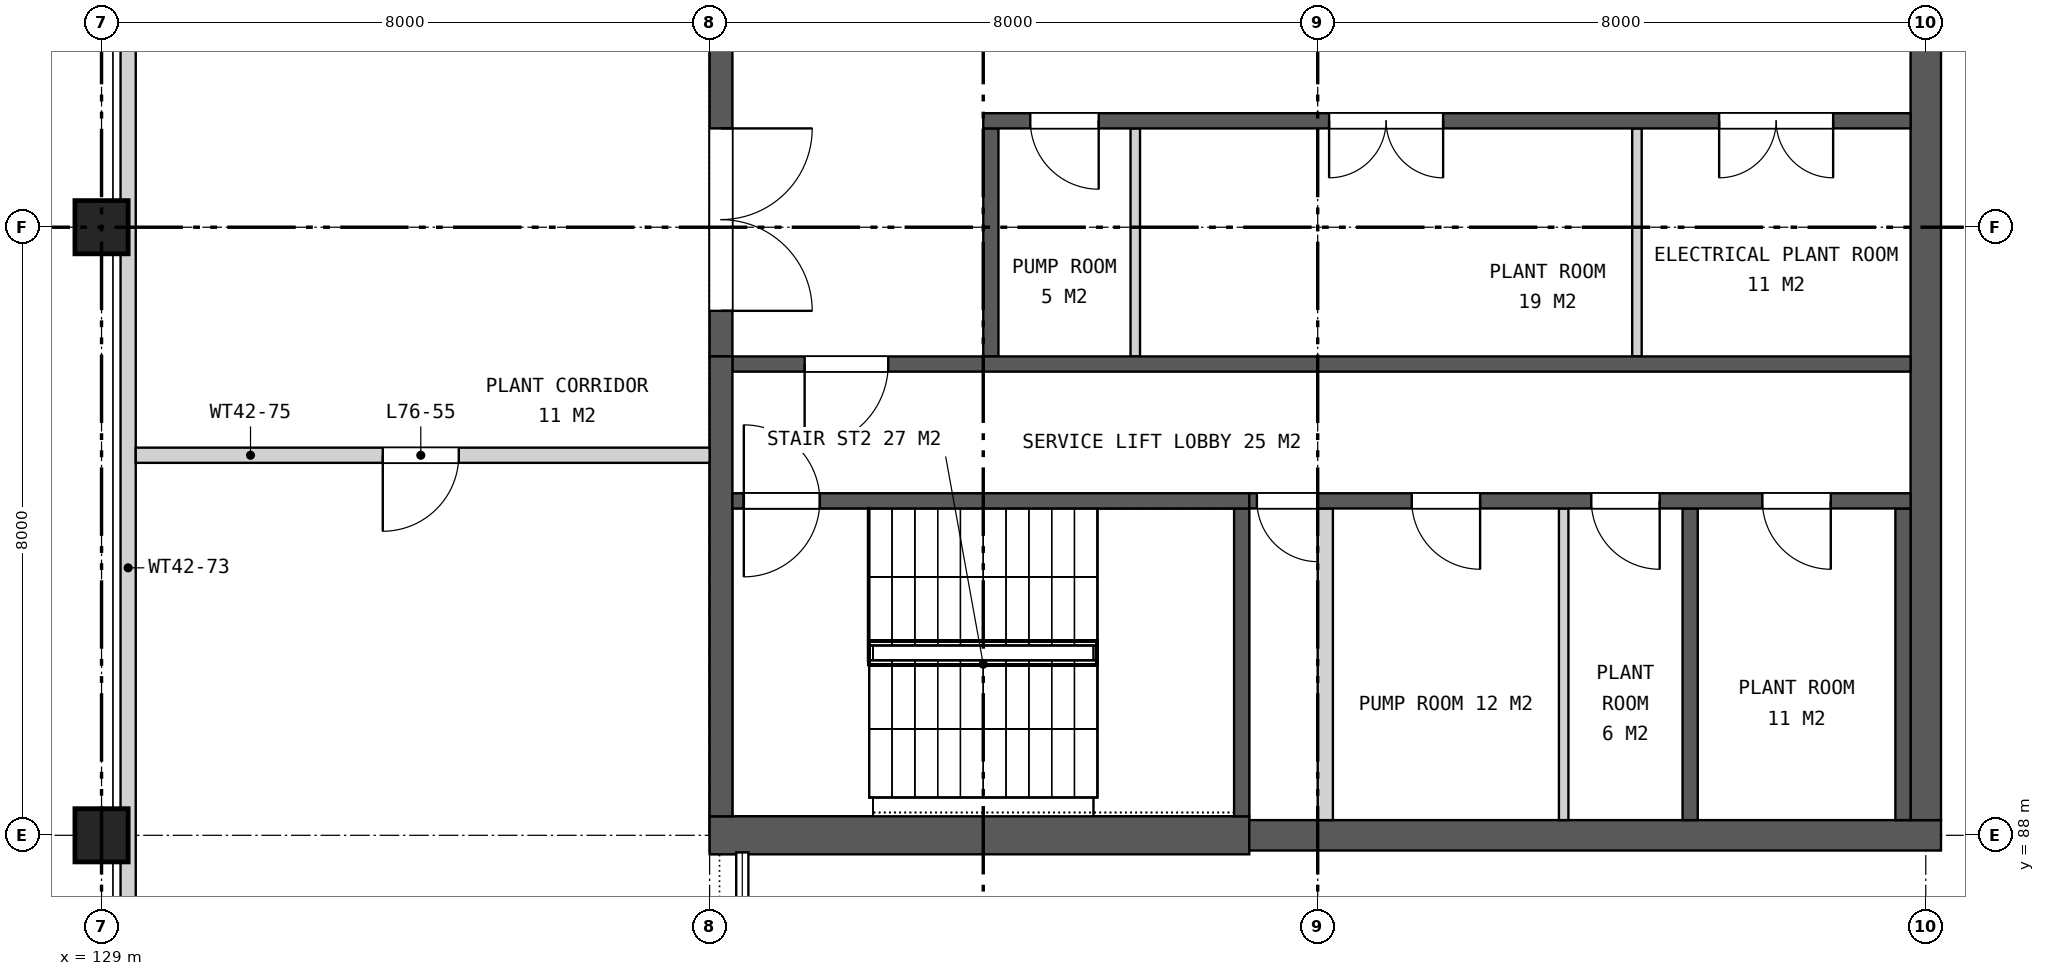
"""IFC4 building model, lengths in metres.
Left out: names, types, materials, properties, quantities, classifications, styles, units other than length and angle.
Written with IfcOpenShell. Run it as: python <this file> out.ifc"""

import sys

from ifc_helpers import new_model, si_unit, direction, frame, frame_2d, origin, origin_2d, place, context, subcontext, project, spatial, rectangle, extrude, element, fill, save


model = new_model("IFC4")
c1 = context("Model", 3, precision=1e-05, world=origin(), true_north=direction((0.0, 1.0)))
c2 = subcontext(c1, "Body", "Model", "MODEL_VIEW")
j1 = project(units=[si_unit("LENGTHUNIT", "METRE"), si_unit("PLANEANGLEUNIT", "RADIAN")], contexts=[c1])
p1 = place(None, origin())
s1 = spatial("IfcSite", under=j1, at=p1, CompositionType="ELEMENT")
p2 = place(p1, origin())
s2 = spatial("IfcBuilding", under=s1, at=p2, CompositionType="ELEMENT")
p3 = place(p2, frame((0.0, 0.0, 349.1)))
s3 = spatial("IfcBuildingStorey", under=s2, at=p3, CompositionType="ELEMENT", Elevation=349.1)
for number, where, z_axis, x_axis in (
    (1, (129.0, 88.0, 0.0), (0.0, 0.0, 1.0), (1.0, 0.0, 0.0)),
    (2, (129.0, 96.0, 0.0), (0.0, 0.0, 1.0), (1.0, 0.0, 0.0)),
):
    element("IfcColumn", number, at=place(p3, frame(where, z_axis=z_axis, x_axis=x_axis)), inside=s3, PredefinedType="COLUMN", context=c2, shape_type="SweptSolid", body=[
        extrude(rectangle(XDim=0.7, YDim=0.7, at=origin_2d()), origin(), (0.0, 0.0, 1.0), 10.23),
    ])
p4 = place(p3, frame((137.0, 88.0, 0.0), z_axis=(0.0, 0.0, 1.0), x_axis=(1.0, 0.0, 0.0)))
e3 = element("IfcWall", 3, at=p4, inside=s3, PredefinedType="SHEAR", context=c2, shape_type="SweptSolid", body=[
    extrude(rectangle(XDim=7.1, YDim=0.5, at=frame_2d((3.55, 0.0))), origin(), (0.0, 0.0, 1.0), 12.0),
])
p5 = place(p3, frame((144.1, 88.0, 0.0), z_axis=(0.0, 0.0, 1.0), x_axis=(1.0, 0.0, 0.0)))
e4 = element("IfcWall", 4, at=p5, inside=s3, PredefinedType="SHEAR", context=c2, shape_type="SweptSolid", body=[
    extrude(rectangle(XDim=9.1, YDim=0.4, at=frame_2d((4.55, 0.0))), origin(), (0.0, 0.0, 1.0), 12.0),
])
p6 = place(p3, frame((153.0, 88.2, 0.0), z_axis=(0.0, 0.0, 1.0), x_axis=(0.0, 1.0, 0.0)))
e5 = element("IfcWall", 5, at=p6, inside=s3, PredefinedType="SHEAR", context=c2, shape_type="SweptSolid", body=[
    extrude(rectangle(XDim=23.6, YDim=0.4, at=frame_2d((11.8, 0.0))), origin(), (0.0, 0.0, 1.0), 12.0),
])
p7 = place(p3, frame((137.15, 94.3, 0.0), z_axis=(0.0, 0.0, 1.0), x_axis=(0.0, 1.0, 0.0)))
e6 = element("IfcWall", 6, at=p7, inside=s3, PredefinedType="SHEAR", context=c2, shape_type="SweptSolid", body=[
    extrude(rectangle(XDim=11.4, YDim=0.3, at=frame_2d((5.7, 0.0))), origin(), (0.0, 0.0, 1.0), 12.0),
])
p8 = place(p7, frame((0.6, 0.0, 0.0)))
e7 = element("IfcOpeningElement", 7, at=p8, cuts=e6, PredefinedType="OPENING", context=c2, shape_type="SweptSolid", body=[
    extrude(rectangle(XDim=2.4, YDim=2.4, at=frame_2d((1.2, 1.2))), frame((0.0, 0.16, 0.0), z_axis=(0.0, -1.0, 0.0), x_axis=(1.0, 0.0, 0.0)), (0.0, 0.0, 1.0), 0.32),
])
p9 = place(p7, frame((4.5, 0.0, 0.0)))
e8 = element("IfcOpeningElement", 8, at=p9, cuts=e6, PredefinedType="OPENING", context=c2, shape_type="SweptSolid", body=[
    extrude(rectangle(XDim=2.4, YDim=2.4, at=frame_2d((1.2, 1.2))), frame((0.0, 0.16, 0.0), z_axis=(0.0, -1.0, 0.0), x_axis=(1.0, 0.0, 0.0)), (0.0, 0.0, 1.0), 0.32),
])
p10 = place(p7, frame((8.4, 0.0, 0.0)))
e9 = element("IfcOpeningElement", 9, at=p10, cuts=e6, PredefinedType="OPENING", context=c2, shape_type="SweptSolid", body=[
    extrude(rectangle(XDim=2.4, YDim=2.4, at=frame_2d((1.2, 1.2))), frame((0.0, 0.16, 0.0), z_axis=(0.0, -1.0, 0.0), x_axis=(1.0, 0.0, 0.0)), (0.0, 0.0, 1.0), 0.32),
])
p11 = place(p3, frame((140.7, 94.3, 0.0), z_axis=(0.0, 0.0, 1.0), x_axis=(0.0, 1.0, 0.0)))
e10 = element("IfcWall", 10, at=p11, inside=s3, PredefinedType="SHEAR", context=c2, shape_type="SweptSolid", body=[
    extrude(rectangle(XDim=3.0, YDim=0.2, at=frame_2d((1.5, 0.0))), origin(), (0.0, 0.0, 1.0), 9.2),
])
for number, where, z_axis, x_axis in (
    (11, (142.6, 94.3, 0.0), (0.0, 0.0, 1.0), (0.0, 1.0, 0.0)),
    (12, (149.2, 94.3, 0.0), (0.0, 0.0, 1.0), (0.0, 1.0, 0.0)),
):
    element("IfcWall", number, at=place(p3, frame(where, z_axis=z_axis, x_axis=x_axis)), inside=s3, PredefinedType="PARTITIONING", context=c2, shape_type="SweptSolid", body=[
        extrude(rectangle(XDim=3.0, YDim=0.125, at=frame_2d((1.5, 0.0))), origin(), (0.0, 0.0, 1.0), 9.2),
    ])
p12 = place(p3, frame((140.6, 97.4, 0.0), z_axis=(0.0, 0.0, 1.0), x_axis=(1.0, 0.0, 0.0)))
e13 = element("IfcWall", 13, at=p12, inside=s3, PredefinedType="SHEAR", context=c2, shape_type="SweptSolid", body=[
    extrude(rectangle(XDim=12.2, YDim=0.2, at=frame_2d((6.1, 0.0))), origin(), (0.0, 0.0, 1.0), 9.2),
])
p13 = place(p12, frame((0.619, 0.0, 0.0)))
e14 = element("IfcOpeningElement", 14, at=p13, cuts=e13, PredefinedType="OPENING", context=c2, shape_type="SweptSolid", body=[
    extrude(rectangle(XDim=0.9, YDim=2.1, at=frame_2d((0.45, 1.05))), frame((0.0, 0.11, 0.0), z_axis=(0.0, -1.0, 0.0), x_axis=(1.0, 0.0, 0.0)), (0.0, 0.0, 1.0), 0.22),
])
p14 = place(p12, frame((4.55, 0.0, 0.0)))
e15 = element("IfcOpeningElement", 15, at=p14, cuts=e13, PredefinedType="OPENING", context=c2, shape_type="SweptSolid", body=[
    extrude(rectangle(XDim=1.5, YDim=2.1, at=frame_2d((0.75, 1.05))), frame((0.0, 0.11, 0.0), z_axis=(0.0, -1.0, 0.0), x_axis=(1.0, 0.0, 0.0)), (0.0, 0.0, 1.0), 0.22),
])
p15 = place(p12, frame((9.681, 0.0, 0.0)))
e16 = element("IfcOpeningElement", 16, at=p15, cuts=e13, PredefinedType="OPENING", context=c2, shape_type="SweptSolid", body=[
    extrude(rectangle(XDim=1.5, YDim=2.1, at=frame_2d((0.75, 1.05))), frame((0.0, 0.11, 0.0), z_axis=(0.0, -1.0, 0.0), x_axis=(1.0, 0.0, 0.0)), (0.0, 0.0, 1.0), 0.22),
])
p16 = place(p3, frame((137.3, 94.2, 0.0), z_axis=(0.0, 0.0, 1.0), x_axis=(1.0, 0.0, 0.0)))
e17 = element("IfcWall", 17, at=p16, inside=s3, PredefinedType="SHEAR", context=c2, shape_type="SweptSolid", body=[
    extrude(rectangle(XDim=15.5, YDim=0.2, at=frame_2d((7.75, 0.0))), origin(), (0.0, 0.0, 1.0), 9.2),
])
p17 = place(p16, frame((0.95, 0.0, 0.0)))
e18 = element("IfcOpeningElement", 18, at=p17, cuts=e17, PredefinedType="OPENING", context=c2, shape_type="SweptSolid", body=[
    extrude(rectangle(XDim=1.1, YDim=2.1, at=frame_2d((0.55, 1.05))), frame((0.0, 0.11, 0.0), z_axis=(0.0, -1.0, 0.0), x_axis=(1.0, 0.0, 0.0)), (0.0, 0.0, 1.0), 0.22),
])
p18 = place(p3, frame((137.15, 88.25, 0.0), z_axis=(0.0, 0.0, 1.0), x_axis=(0.0, 1.0, 0.0)))
e19 = element("IfcWall", 19, at=p18, inside=s3, PredefinedType="SHEAR", context=c2, shape_type="SweptSolid", body=[
    extrude(rectangle(XDim=6.05, YDim=0.3, at=frame_2d((3.025, 0.0))), origin(), (0.0, 0.0, 1.0), 12.0),
])
p19 = place(p3, frame((144.0, 88.25, 0.0), z_axis=(0.0, 0.0, 1.0), x_axis=(0.0, 1.0, 0.0)))
e20 = element("IfcWall", 20, at=p19, inside=s3, PredefinedType="SHEAR", context=c2, shape_type="SweptSolid", body=[
    extrude(rectangle(XDim=4.05, YDim=0.2, at=frame_2d((2.025, 0.0))), origin(), (0.0, 0.0, 1.0), 11.6),
])
for number, where, z_axis, x_axis in (
    (21, (149.9, 88.2, 0.0), (0.0, 0.0, 1.0), (0.0, 1.0, 0.0)),
    (22, (152.7, 88.2, 0.0), (0.0, 0.0, 1.0), (0.0, 1.0, 0.0)),
):
    element("IfcWall", number, at=place(p3, frame(where, z_axis=z_axis, x_axis=x_axis)), inside=s3, PredefinedType="SHEAR", context=c2, shape_type="SweptSolid", body=[
        extrude(rectangle(XDim=4.1, YDim=0.2, at=frame_2d((2.05, 0.0))), origin(), (0.0, 0.0, 1.0), 9.2),
    ])
p20 = place(p3, frame((145.1, 88.2, 0.0), z_axis=(0.0, 0.0, 1.0), x_axis=(0.0, 1.0, 0.0)))
e23 = element("IfcWall", 23, at=p20, inside=s3, PredefinedType="PARTITIONING", context=c2, shape_type="SweptSolid", body=[
    extrude(rectangle(XDim=4.1, YDim=0.2, at=frame_2d((2.05, 0.0))), origin(), (0.0, 0.0, 1.0), 9.2),
])
p21 = place(p3, frame((148.236, 88.2, 0.0), z_axis=(0.0, 0.0, 1.0), x_axis=(0.0, 1.0, 0.0)))
e24 = element("IfcWall", 24, at=p21, inside=s3, PredefinedType="PARTITIONING", context=c2, shape_type="SweptSolid", body=[
    extrude(rectangle(XDim=4.1, YDim=0.125, at=frame_2d((2.05, 0.0))), origin(), (0.0, 0.0, 1.0), 9.2),
])
p22 = place(p3, frame((137.3, 92.4, 0.0), z_axis=(0.0, 0.0, 1.0), x_axis=(1.0, 0.0, 0.0)))
e25 = element("IfcWall", 25, at=p22, inside=s3, PredefinedType="SHEAR", context=c2, shape_type="SweptSolid", body=[
    extrude(rectangle(XDim=6.8, YDim=0.2, at=frame_2d((3.4, 0.0))), origin(), (0.0, 0.0, 1.0), 11.6),
])
p23 = place(p22, frame((0.15, 0.0, 0.0)))
e26 = element("IfcOpeningElement", 26, at=p23, cuts=e25, PredefinedType="OPENING", context=c2, shape_type="SweptSolid", body=[
    extrude(rectangle(XDim=1.0, YDim=2.1, at=frame_2d((0.5, 1.05))), frame((0.0, 0.11, 0.0), z_axis=(0.0, -1.0, 0.0), x_axis=(1.0, 0.0, 0.0)), (0.0, 0.0, 1.0), 0.22),
])
p24 = place(p22, frame((0.15, 0.0, 9.2)))
e27 = element("IfcOpeningElement", 27, at=p24, cuts=e25, PredefinedType="OPENING", context=c2, shape_type="SweptSolid", body=[
    extrude(rectangle(XDim=1.0, YDim=2.1, at=frame_2d((0.5, 1.05))), frame((0.0, 0.11, 0.0), z_axis=(0.0, -1.0, 0.0), x_axis=(1.0, 0.0, 0.0)), (0.0, 0.0, 1.0), 0.22),
])
p25 = place(p3, frame((144.1, 92.4, 0.0), z_axis=(0.0, 0.0, 1.0), x_axis=(1.0, 0.0, 0.0)))
e28 = element("IfcWall", 28, at=p25, inside=s3, PredefinedType="SHEAR", context=c2, shape_type="SweptSolid", body=[
    extrude(rectangle(XDim=8.7, YDim=0.2, at=frame_2d((4.35, 0.0))), origin(), (0.0, 0.0, 1.0), 9.2),
])
p26 = place(p25, frame((0.1, 0.0, 0.0)))
e29 = element("IfcOpeningElement", 29, at=p26, cuts=e28, PredefinedType="OPENING", context=c2, shape_type="SweptSolid", body=[
    extrude(rectangle(XDim=0.8, YDim=2.1, at=frame_2d((0.4, 1.05))), frame((0.0, 0.11, 0.0), z_axis=(0.0, -1.0, 0.0), x_axis=(1.0, 0.0, 0.0)), (0.0, 0.0, 1.0), 0.22),
])
p27 = place(p25, frame((2.137, 0.0, 0.0)))
e30 = element("IfcOpeningElement", 30, at=p27, cuts=e28, PredefinedType="OPENING", context=c2, shape_type="SweptSolid", body=[
    extrude(rectangle(XDim=0.9, YDim=2.1, at=frame_2d((0.45, 1.05))), frame((0.0, 0.11, 0.0), z_axis=(0.0, -1.0, 0.0), x_axis=(1.0, 0.0, 0.0)), (0.0, 0.0, 1.0), 0.22),
])
p28 = place(p25, frame((4.499, 0.0, 0.0)))
e31 = element("IfcOpeningElement", 31, at=p28, cuts=e28, PredefinedType="OPENING", context=c2, shape_type="SweptSolid", body=[
    extrude(rectangle(XDim=0.9, YDim=2.1, at=frame_2d((0.45, 1.05))), frame((0.0, 0.11, 0.0), z_axis=(0.0, -1.0, 0.0), x_axis=(1.0, 0.0, 0.0)), (0.0, 0.0, 1.0), 0.22),
])
p29 = place(p25, frame((6.75, 0.0, 0.0)))
e32 = element("IfcOpeningElement", 32, at=p29, cuts=e28, PredefinedType="OPENING", context=c2, shape_type="SweptSolid", body=[
    extrude(rectangle(XDim=0.9, YDim=2.1, at=frame_2d((0.45, 1.05))), frame((0.0, 0.11, 0.0), z_axis=(0.0, -1.0, 0.0), x_axis=(1.0, 0.0, 0.0)), (0.0, 0.0, 1.0), 0.22),
])
p30 = place(p3, frame((129.35, 71.73, 0.0), z_axis=(0.0, 0.0, 1.0), x_axis=(0.0, 1.0, 0.0)))
e33 = element("IfcWall", 33, at=p30, inside=s3, PredefinedType="SOLIDWALL", context=c2, shape_type="SweptSolid", body=[
    extrude(rectangle(XDim=56.54, YDim=0.2, at=frame_2d((28.27, 0.0))), origin(), (0.0, 0.0, 1.0), 11.6),
])
p31 = place(p30, frame((27.32, 0.0, 0.0)))
e34 = element("IfcOpeningElement", 34, at=p31, cuts=e33, PredefinedType="OPENING", context=c2, shape_type="SweptSolid", body=[
    extrude(rectangle(XDim=1.8, YDim=2.1, at=frame_2d((0.9, 1.05))), frame((0.0, 0.11, 0.0), z_axis=(0.0, -1.0, 0.0), x_axis=(1.0, 0.0, 0.0)), (0.0, 0.0, 1.0), 0.22),
])
p32 = place(p3, frame((129.45, 93.0, 0.0), z_axis=(0.0, 0.0, 1.0), x_axis=(1.0, 0.0, 0.0)))
e35 = element("IfcWall", 35, at=p32, inside=s3, PredefinedType="SOLIDWALL", context=c2, shape_type="SweptSolid", body=[
    extrude(rectangle(XDim=7.55, YDim=0.2, at=frame_2d((3.775, 0.0))), origin(), (0.0, 0.0, 1.0), 11.6),
])
p33 = place(p32, frame((3.25, 0.0, 0.0)))
e36 = element("IfcOpeningElement", 36, at=p33, cuts=e35, PredefinedType="OPENING", context=c2, shape_type="SweptSolid", body=[
    extrude(rectangle(XDim=1.0, YDim=2.1, at=frame_2d((0.5, 1.05))), frame((0.0, 0.11, 0.0), z_axis=(0.0, -1.0, 0.0), x_axis=(1.0, 0.0, 0.0)), (0.0, 0.0, 1.0), 0.22),
])
p34 = place(p8, frame((2.4, 0.0, 0.0), z_axis=(0.0, 0.0, 1.0), x_axis=(-1.0, 0.0, 0.0)))
e37 = element("IfcDoor", 37, at=p34, inside=s3, OperationType="DOUBLE_DOOR_SINGLE_SWING", PredefinedType="DOOR", context=c2, shape_type="SweptSolid", body=[
    extrude(rectangle(XDim=2.4, YDim=2.4, at=frame_2d((1.2, 1.2))), frame((0.0, 0.025, 0.0), z_axis=(0.0, -1.0, 0.0), x_axis=(1.0, 0.0, 0.0)), (0.0, 0.0, 1.0), 0.05),
])
fill(e7, e37)
p35 = place(p13, frame((0.9, 0.0, 0.0), z_axis=(0.0, 0.0, 1.0), x_axis=(-1.0, 0.0, 0.0)))
e38 = element("IfcDoor", 38, at=p35, inside=s3, OperationType="SINGLE_SWING_LEFT", PredefinedType="DOOR", context=c2, shape_type="SweptSolid", body=[
    extrude(rectangle(XDim=0.9, YDim=2.1, at=frame_2d((0.45, 1.05))), frame((0.0, 0.025, 0.0), z_axis=(0.0, -1.0, 0.0), x_axis=(1.0, 0.0, 0.0)), (0.0, 0.0, 1.0), 0.05),
])
fill(e14, e38)
p36 = place(p14, frame((1.5, 0.0, 0.0), z_axis=(0.0, 0.0, 1.0), x_axis=(-1.0, 0.0, 0.0)))
e39 = element("IfcDoor", 39, at=p36, inside=s3, OperationType="DOUBLE_DOOR_SINGLE_SWING", PredefinedType="DOOR", context=c2, shape_type="SweptSolid", body=[
    extrude(rectangle(XDim=1.5, YDim=2.1, at=frame_2d((0.75, 1.05))), frame((0.0, 0.025, 0.0), z_axis=(0.0, -1.0, 0.0), x_axis=(1.0, 0.0, 0.0)), (0.0, 0.0, 1.0), 0.05),
])
fill(e15, e39)
p37 = place(p15, frame((1.5, 0.0, 0.0), z_axis=(0.0, 0.0, 1.0), x_axis=(-1.0, 0.0, 0.0)))
e40 = element("IfcDoor", 40, at=p37, inside=s3, OperationType="DOUBLE_DOOR_SINGLE_SWING", PredefinedType="DOOR", context=c2, shape_type="SweptSolid", body=[
    extrude(rectangle(XDim=1.5, YDim=2.1, at=frame_2d((0.75, 1.05))), frame((0.0, 0.025, 0.0), z_axis=(0.0, -1.0, 0.0), x_axis=(1.0, 0.0, 0.0)), (0.0, 0.0, 1.0), 0.05),
])
fill(e16, e40)
p38 = place(p17, frame((1.1, 0.0, 0.0), z_axis=(0.0, 0.0, 1.0), x_axis=(-1.0, 0.0, 0.0)))
e41 = element("IfcDoor", 41, at=p38, inside=s3, OperationType="SINGLE_SWING_RIGHT", PredefinedType="DOOR", context=c2, shape_type="SweptSolid", body=[
    extrude(rectangle(XDim=1.1, YDim=2.1, at=frame_2d((0.55, 1.05))), frame((0.0, 0.025, 0.0), z_axis=(0.0, -1.0, 0.0), x_axis=(1.0, 0.0, 0.0)), (0.0, 0.0, 1.0), 0.05),
])
fill(e18, e41)
p39 = place(p23, frame((1.0, 0.0, 0.0), z_axis=(0.0, 0.0, 1.0), x_axis=(-1.0, 0.0, 0.0)))
e42 = element("IfcDoor", 42, at=p39, inside=s3, OperationType="SINGLE_SWING_RIGHT", PredefinedType="DOOR", context=c2, shape_type="SweptSolid", body=[
    extrude(rectangle(XDim=1.0, YDim=2.1, at=frame_2d((0.5, 1.05))), frame((0.0, 0.025, 0.0), z_axis=(0.0, -1.0, 0.0), x_axis=(1.0, 0.0, 0.0)), (0.0, 0.0, 1.0), 0.05),
])
fill(e26, e42)
p40 = place(p24, origin())
e43 = element("IfcDoor", 43, at=p40, inside=s3, OperationType="SINGLE_SWING_LEFT", PredefinedType="DOOR", context=c2, shape_type="SweptSolid", body=[
    extrude(rectangle(XDim=1.0, YDim=2.1, at=frame_2d((0.5, 1.05))), frame((0.0, 0.025, 0.0), z_axis=(0.0, -1.0, 0.0), x_axis=(1.0, 0.0, 0.0)), (0.0, 0.0, 1.0), 0.05),
])
fill(e27, e43)
p41 = place(p26, frame((0.8, 0.0, 0.0), z_axis=(0.0, 0.0, 1.0), x_axis=(-1.0, 0.0, 0.0)))
e44 = element("IfcDoor", 44, at=p41, inside=s3, OperationType="SINGLE_SWING_LEFT", PredefinedType="DOOR", context=c2, shape_type="SweptSolid", body=[
    extrude(rectangle(XDim=0.8, YDim=2.1, at=frame_2d((0.4, 1.05))), frame((0.0, 0.025, 0.0), z_axis=(0.0, -1.0, 0.0), x_axis=(1.0, 0.0, 0.0)), (0.0, 0.0, 1.0), 0.05),
])
fill(e29, e44)
p42 = place(p27, frame((0.9, 0.0, 0.0), z_axis=(0.0, 0.0, 1.0), x_axis=(-1.0, 0.0, 0.0)))
e45 = element("IfcDoor", 45, at=p42, inside=s3, OperationType="SINGLE_SWING_LEFT", PredefinedType="DOOR", context=c2, shape_type="SweptSolid", body=[
    extrude(rectangle(XDim=0.9, YDim=2.1, at=frame_2d((0.45, 1.05))), frame((0.0, 0.025, 0.0), z_axis=(0.0, -1.0, 0.0), x_axis=(1.0, 0.0, 0.0)), (0.0, 0.0, 1.0), 0.05),
])
fill(e30, e45)
p43 = place(p28, frame((0.9, 0.0, 0.0), z_axis=(0.0, 0.0, 1.0), x_axis=(-1.0, 0.0, 0.0)))
e46 = element("IfcDoor", 46, at=p43, inside=s3, OperationType="SINGLE_SWING_LEFT", PredefinedType="DOOR", context=c2, shape_type="SweptSolid", body=[
    extrude(rectangle(XDim=0.9, YDim=2.1, at=frame_2d((0.45, 1.05))), frame((0.0, 0.025, 0.0), z_axis=(0.0, -1.0, 0.0), x_axis=(1.0, 0.0, 0.0)), (0.0, 0.0, 1.0), 0.05),
])
fill(e31, e46)
p44 = place(p29, frame((0.9, 0.0, 0.0), z_axis=(0.0, 0.0, 1.0), x_axis=(-1.0, 0.0, 0.0)))
e47 = element("IfcDoor", 47, at=p44, inside=s3, OperationType="SINGLE_SWING_LEFT", PredefinedType="DOOR", context=c2, shape_type="SweptSolid", body=[
    extrude(rectangle(XDim=0.9, YDim=2.1, at=frame_2d((0.45, 1.05))), frame((0.0, 0.025, 0.0), z_axis=(0.0, -1.0, 0.0), x_axis=(1.0, 0.0, 0.0)), (0.0, 0.0, 1.0), 0.05),
])
fill(e32, e47)
p45 = place(p33, frame((1.0, 0.0, 0.0), z_axis=(0.0, 0.0, 1.0), x_axis=(-1.0, 0.0, 0.0)))
e48 = element("IfcDoor", 48, at=p45, inside=s3, OperationType="SINGLE_SWING_RIGHT", PredefinedType="DOOR", context=c2, shape_type="SweptSolid", body=[
    extrude(rectangle(XDim=1.0, YDim=2.1, at=frame_2d((0.5, 1.05))), frame((0.0, 0.025, 0.0), z_axis=(0.0, -1.0, 0.0), x_axis=(1.0, 0.0, 0.0)), (0.0, 0.0, 1.0), 0.05),
])
fill(e36, e48)
save(model, sys.argv[1])
